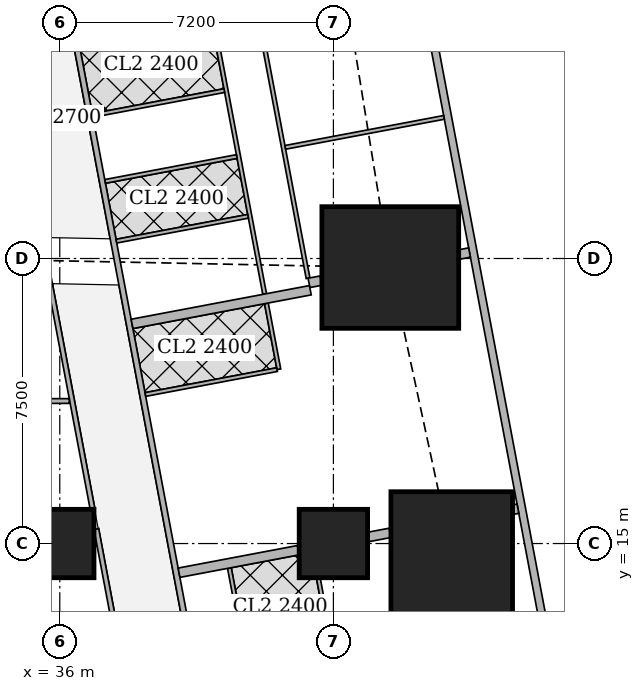
"""IFC4 building model, lengths in metres.
Left out: names, types, materials, properties, quantities, classifications, styles, units other than length and angle.
Written with IfcOpenShell. Run it as: python <this file> out.ifc"""

import sys

from ifc_helpers import new_model, si_unit, direction, frame, frame_2d, origin, origin_2d, place, context, subcontext, project, spatial, rectangle, extrude, element, fill, save


model = new_model("IFC4")
c1 = context("Model", 3, precision=1e-05, world=origin(), true_north=direction((0.0, 1.0)))
c2 = subcontext(c1, "Body", "Model", "MODEL_VIEW")
j1 = project(units=[si_unit("LENGTHUNIT", "METRE"), si_unit("PLANEANGLEUNIT", "RADIAN")], contexts=[c1])
p1 = place(None, origin())
s1 = spatial("IfcSite", under=j1, at=p1, CompositionType="ELEMENT")
p2 = place(p1, origin())
s2 = spatial("IfcBuilding", under=s1, at=p2, CompositionType="ELEMENT")
p3 = place(p2, frame((0.0, 0.0, 20.0)))
s3 = spatial("IfcBuildingStorey", under=s2, at=p3, CompositionType="ELEMENT", Elevation=20.0)
for number, where, z_axis, x_axis in (
    (1, (36.0, 15.0, 0.0), (0.0, 0.0, 1.0), (1.0, 0.0, 0.0)),
    (2, (43.2, 15.0, 0.0), (0.0, 0.0, 1.0), (1.0, 0.0, 0.0)),
):
    element("IfcColumn", number, at=place(p3, frame(where, z_axis=z_axis, x_axis=x_axis)), inside=s3, PredefinedType="COLUMN", context=c2, shape_type="SweptSolid", body=[
        extrude(rectangle(XDim=1.8, YDim=1.8, at=origin_2d()), origin(), (0.0, 0.0, 1.0), 3.75),
    ])
p4 = place(p3, frame((46.314, 14.763, 0.0), z_axis=(0.0, 0.0, 1.0), x_axis=(1.0, 0.0, 0.0)))
e3 = element("IfcColumn", 3, at=p4, inside=s3, PredefinedType="COLUMN", context=c2, shape_type="SweptSolid", body=[
    extrude(rectangle(XDim=3.2, YDim=3.2, at=origin_2d()), origin(), (0.0, 0.0, 1.0), 3.75),
])
p5 = place(p3, frame((44.697, 22.263, 0.0), z_axis=(0.0, 0.0, 1.0), x_axis=(1.0, 0.0, 0.0)))
e4 = element("IfcColumn", 4, at=p5, inside=s3, PredefinedType="COLUMN", context=c2, shape_type="SweptSolid", body=[
    extrude(rectangle(XDim=3.6, YDim=3.2, at=origin_2d()), origin(), (0.0, 0.0, 1.0), 3.75),
])
p6 = place(p3, frame((50.653, 2.703, 0.0), z_axis=(0.0, 0.0, 1.0), x_axis=(-0.185612026696, 0.982623109613, 0.0)))
e5 = element("IfcWall", 5, at=p6, inside=s3, PredefinedType="SOLIDWALL", context=c2, shape_type="SweptSolid", body=[
    extrude(rectangle(XDim=41.393, YDim=0.2, at=frame_2d((20.697, 0.0))), origin(), (0.0, 0.0, 1.0), 3.5),
])
p7 = place(p6, frame((1.633, 0.0, 0.9)))
e6 = element("IfcOpeningElement", 6, at=p7, cuts=e5, PredefinedType="OPENING", context=c2, shape_type="SweptSolid", body=[
    extrude(rectangle(XDim=1.8, YDim=1.5, at=frame_2d((0.9, 0.75))), frame((0.0, 0.11, 0.0), z_axis=(0.0, -1.0, 0.0), x_axis=(1.0, 0.0, 0.0)), (0.0, 0.0, 1.0), 0.22),
])
p8 = place(p6, frame((6.032, 0.0, 0.9)))
e7 = element("IfcOpeningElement", 7, at=p8, cuts=e5, PredefinedType="OPENING", context=c2, shape_type="SweptSolid", body=[
    extrude(rectangle(XDim=1.8, YDim=1.5, at=frame_2d((0.9, 0.75))), frame((0.0, 0.11, 0.0), z_axis=(0.0, -1.0, 0.0), x_axis=(1.0, 0.0, 0.0)), (0.0, 0.0, 1.0), 0.22),
])
p9 = place(p6, frame((9.848, 0.0, 0.9)))
e8 = element("IfcOpeningElement", 8, at=p9, cuts=e5, PredefinedType="OPENING", context=c2, shape_type="SweptSolid", body=[
    extrude(rectangle(XDim=1.8, YDim=1.5, at=frame_2d((0.9, 0.75))), frame((0.0, 0.11, 0.0), z_axis=(0.0, -1.0, 0.0), x_axis=(1.0, 0.0, 0.0)), (0.0, 0.0, 1.0), 0.22),
])
p10 = place(p6, frame((17.481, 0.0, 0.9)))
e9 = element("IfcOpeningElement", 9, at=p10, cuts=e5, PredefinedType="OPENING", context=c2, shape_type="SweptSolid", body=[
    extrude(rectangle(XDim=1.8, YDim=1.5, at=frame_2d((0.9, 0.75))), frame((0.0, 0.11, 0.0), z_axis=(0.0, -1.0, 0.0), x_axis=(1.0, 0.0, 0.0)), (0.0, 0.0, 1.0), 0.22),
])
p11 = place(p6, frame((21.297, 0.0, 0.9)))
e10 = element("IfcOpeningElement", 10, at=p11, cuts=e5, PredefinedType="OPENING", context=c2, shape_type="SweptSolid", body=[
    extrude(rectangle(XDim=1.8, YDim=1.5, at=frame_2d((0.9, 0.75))), frame((0.0, 0.11, 0.0), z_axis=(0.0, -1.0, 0.0), x_axis=(1.0, 0.0, 0.0)), (0.0, 0.0, 1.0), 0.22),
])
p12 = place(p6, frame((25.113, 0.0, 0.9)))
e11 = element("IfcOpeningElement", 11, at=p12, cuts=e5, PredefinedType="OPENING", context=c2, shape_type="SweptSolid", body=[
    extrude(rectangle(XDim=1.8, YDim=1.5, at=frame_2d((0.9, 0.75))), frame((0.0, 0.11, 0.0), z_axis=(0.0, -1.0, 0.0), x_axis=(1.0, 0.0, 0.0)), (0.0, 0.0, 1.0), 0.22),
])
p13 = place(p6, frame((28.93, 0.0, 0.9)))
e12 = element("IfcOpeningElement", 12, at=p13, cuts=e5, PredefinedType="OPENING", context=c2, shape_type="SweptSolid", body=[
    extrude(rectangle(XDim=1.8, YDim=1.5, at=frame_2d((0.9, 0.75))), frame((0.0, 0.11, 0.0), z_axis=(0.0, -1.0, 0.0), x_axis=(1.0, 0.0, 0.0)), (0.0, 0.0, 1.0), 0.22),
])
p14 = place(p6, frame((32.746, 0.0, 0.9)))
e13 = element("IfcOpeningElement", 13, at=p14, cuts=e5, PredefinedType="OPENING", context=c2, shape_type="SweptSolid", body=[
    extrude(rectangle(XDim=1.8, YDim=1.5, at=frame_2d((0.9, 0.75))), frame((0.0, 0.11, 0.0), z_axis=(0.0, -1.0, 0.0), x_axis=(1.0, 0.0, 0.0)), (0.0, 0.0, 1.0), 0.22),
])
p15 = place(p6, frame((36.481, 0.0, 0.9)))
e14 = element("IfcOpeningElement", 14, at=p15, cuts=e5, PredefinedType="OPENING", context=c2, shape_type="SweptSolid", body=[
    extrude(rectangle(XDim=1.8, YDim=1.5, at=frame_2d((0.9, 0.75))), frame((0.0, 0.11, 0.0), z_axis=(0.0, -1.0, 0.0), x_axis=(1.0, 0.0, 0.0)), (0.0, 0.0, 1.0), 0.22),
])
p16 = place(p3, frame((33.755, 42.325, 0.0), z_axis=(0.0, 0.0, 1.0), x_axis=(0.185611461091, -0.982623216453, 0.0)))
e15 = element("IfcWall", 15, at=p16, inside=s3, PredefinedType="SOLIDWALL", context=c2, shape_type="SweptSolid", body=[
    extrude(rectangle(XDim=40.241, YDim=0.15, at=frame_2d((20.121, 0.0))), origin(), (0.0, 0.0, 1.0), 2.5),
])
p17 = place(p16, frame((7.325, 0.0, 0.0)))
e16 = element("IfcOpeningElement", 16, at=p17, cuts=e15, PredefinedType="OPENING", context=c2, shape_type="SweptSolid", body=[
    extrude(rectangle(XDim=1.0, YDim=2.1, at=frame_2d((0.5, 1.05))), frame((0.0, 0.085, 0.0), z_axis=(0.0, -1.0, 0.0), x_axis=(1.0, 0.0, 0.0)), (0.0, 0.0, 1.0), 0.17),
])
p18 = place(p16, frame((11.902, 0.0, 0.0)))
e17 = element("IfcOpeningElement", 17, at=p18, cuts=e15, PredefinedType="OPENING", context=c2, shape_type="SweptSolid", body=[
    extrude(rectangle(XDim=1.0, YDim=2.1, at=frame_2d((0.5, 1.05))), frame((0.0, 0.085, 0.0), z_axis=(0.0, -1.0, 0.0), x_axis=(1.0, 0.0, 0.0)), (0.0, 0.0, 1.0), 0.17),
])
p19 = place(p16, frame((25.718, 0.0, 0.0)))
e18 = element("IfcOpeningElement", 18, at=p19, cuts=e15, PredefinedType="OPENING", context=c2, shape_type="SweptSolid", body=[
    extrude(rectangle(XDim=1.0, YDim=2.1, at=frame_2d((0.5, 1.05))), frame((0.0, 0.085, 0.0), z_axis=(0.0, -1.0, 0.0), x_axis=(1.0, 0.0, 0.0)), (0.0, 0.0, 1.0), 0.17),
])
p20 = place(p16, frame((31.788, 0.0, 0.0)))
e19 = element("IfcOpeningElement", 19, at=p20, cuts=e15, PredefinedType="OPENING", context=c2, shape_type="SweptSolid", body=[
    extrude(rectangle(XDim=1.0, YDim=2.1, at=frame_2d((0.5, 1.05))), frame((0.0, 0.085, 0.0), z_axis=(0.0, -1.0, 0.0), x_axis=(1.0, 0.0, 0.0)), (0.0, 0.0, 1.0), 0.17),
])
p21 = place(p3, frame((41.157, 29.273, 0.0), z_axis=(0.0, 0.0, 1.0), x_axis=(0.18542464283, -0.982658486877, 0.0)))
e20 = element("IfcWall", 20, at=p21, inside=s3, PredefinedType="PARTITIONING", context=c2, shape_type="SweptSolid", body=[
    extrude(rectangle(XDim=7.421, YDim=0.1, at=frame_2d((3.71, 0.0))), origin(), (0.0, 0.0, 1.0), 2.5),
])
p22 = place(p21, frame((1.4, 0.0, 0.0)))
e21 = element("IfcOpeningElement", 21, at=p22, cuts=e20, PredefinedType="OPENING", context=c2, shape_type="SweptSolid", body=[
    extrude(rectangle(XDim=0.9, YDim=2.1, at=frame_2d((0.45, 1.05))), frame((0.0, 0.06, 0.0), z_axis=(0.0, -1.0, 0.0), x_axis=(1.0, 0.0, 0.0)), (0.0, 0.0, 1.0), 0.12),
])
p23 = place(p21, frame((4.126, 0.0, 0.0)))
e22 = element("IfcOpeningElement", 22, at=p23, cuts=e20, PredefinedType="OPENING", context=c2, shape_type="SweptSolid", body=[
    extrude(rectangle(XDim=0.9, YDim=2.1, at=frame_2d((0.45, 1.05))), frame((0.0, 0.06, 0.0), z_axis=(0.0, -1.0, 0.0), x_axis=(1.0, 0.0, 0.0)), (0.0, 0.0, 1.0), 0.12),
])
p24 = place(p3, frame((39.997, 28.942, 0.0), z_axis=(0.0, 0.0, 1.0), x_axis=(0.185686318797, -0.982609073341, 0.0)))
e23 = element("IfcWall", 23, at=p24, inside=s3, PredefinedType="PARTITIONING", context=c2, shape_type="SweptSolid", body=[
    extrude(rectangle(XDim=7.508, YDim=0.1, at=frame_2d((3.754, 0.0))), origin(), (0.0, 0.0, 1.0), 2.5),
])
p25 = place(p24, frame((0.576, 0.0, 0.0)))
e24 = element("IfcOpeningElement", 24, at=p25, cuts=e23, PredefinedType="OPENING", context=c2, shape_type="SweptSolid", body=[
    extrude(rectangle(XDim=0.9, YDim=2.1, at=frame_2d((0.45, 1.05))), frame((0.0, 0.06, 0.0), z_axis=(0.0, -1.0, 0.0), x_axis=(1.0, 0.0, 0.0)), (0.0, 0.0, 1.0), 0.12),
])
p26 = place(p24, frame((4.166, 0.0, 0.0)))
e25 = element("IfcOpeningElement", 25, at=p26, cuts=e23, PredefinedType="OPENING", context=c2, shape_type="SweptSolid", body=[
    extrude(rectangle(XDim=0.9, YDim=2.1, at=frame_2d((0.45, 1.05))), frame((0.0, 0.06, 0.0), z_axis=(0.0, -1.0, 0.0), x_axis=(1.0, 0.0, 0.0)), (0.0, 0.0, 1.0), 0.12),
])
p27 = place(p24, frame((2.483, 0.0, 0.0)))
e26 = element("IfcOpeningElement", 26, at=p27, cuts=e23, PredefinedType="OPENING", context=c2, shape_type="SweptSolid", body=[
    extrude(rectangle(XDim=0.9, YDim=2.1, at=frame_2d((0.45, 1.05))), frame((0.0, 0.06, 0.0), z_axis=(0.0, -1.0, 0.0), x_axis=(1.0, 0.0, 0.0)), (0.0, 0.0, 1.0), 0.12),
])
p28 = place(p24, frame((6.074, 0.0, 0.0)))
e27 = element("IfcOpeningElement", 27, at=p28, cuts=e23, PredefinedType="OPENING", context=c2, shape_type="SweptSolid", body=[
    extrude(rectangle(XDim=0.9, YDim=2.1, at=frame_2d((0.45, 1.05))), frame((0.0, 0.06, 0.0), z_axis=(0.0, -1.0, 0.0), x_axis=(1.0, 0.0, 0.0)), (0.0, 0.0, 1.0), 0.12),
])
p29 = place(p3, frame((46.11, 26.213, 0.0), z_axis=(0.0, 0.0, 1.0), x_axis=(-0.982623519589, -0.185609856287, 0.0)))
e28 = element("IfcWall", 28, at=p29, inside=s3, PredefinedType="PARTITIONING", context=c2, shape_type="SweptSolid", body=[
    extrude(rectangle(XDim=4.25, YDim=0.1, at=frame_2d((2.125, 0.0))), origin(), (0.0, 0.0, 1.0), 2.05),
])
p30 = place(p3, frame((40.656, 25.183, 0.0), z_axis=(0.0, 0.0, 1.0), x_axis=(-0.982576058723, -0.185860939478, 0.0)))
e29 = element("IfcWall", 29, at=p30, inside=s3, PredefinedType="PARTITIONING", context=c2, shape_type="SweptSolid", body=[
    extrude(rectangle(XDim=3.524, YDim=0.1, at=frame_2d((1.762, 0.0))), origin(), (0.0, 0.0, 1.0), 3.5),
])
p31 = place(p3, frame((40.329, 26.918, 0.0), z_axis=(0.0, 0.0, 1.0), x_axis=(-0.982638553676, -0.185530247748, 0.0)))
e30 = element("IfcWall", 30, at=p31, inside=s3, PredefinedType="PARTITIONING", context=c2, shape_type="SweptSolid", body=[
    extrude(rectangle(XDim=3.525, YDim=0.1, at=frame_2d((1.763, 0.0))), origin(), (0.0, 0.0, 1.0), 3.5),
])
p32 = place(p3, frame((40.954, 23.61, 0.0), z_axis=(0.0, 0.0, 1.0), x_axis=(-0.982638553676, -0.185530247748, 0.0)))
e31 = element("IfcWall", 31, at=p32, inside=s3, PredefinedType="PARTITIONING", context=c2, shape_type="SweptSolid", body=[
    extrude(rectangle(XDim=3.525, YDim=0.1, at=frame_2d((1.763, 0.0))), origin(), (0.0, 0.0, 1.0), 2.5),
])
p33 = place(p3, frame((41.437, 21.319, 0.0), z_axis=(0.0, 0.0, 1.0), x_axis=(0.185783379659, -0.98259072652, 0.0)))
e32 = element("IfcWall", 32, at=p33, inside=s3, PredefinedType="PARTITIONING", context=c2, shape_type="SweptSolid", body=[
    extrude(rectangle(XDim=1.765, YDim=0.1, at=frame_2d((0.882, 0.0))), origin(), (0.0, 0.0, 1.0), 3.5),
])
p34 = place(p33, frame((0.374, 0.0, 0.0)))
e33 = element("IfcOpeningElement", 33, at=p34, cuts=e32, PredefinedType="OPENING", context=c2, shape_type="SweptSolid", body=[
    extrude(rectangle(XDim=0.9, YDim=2.1, at=frame_2d((0.45, 1.05))), frame((0.0, 0.06, 0.0), z_axis=(0.0, -1.0, 0.0), x_axis=(1.0, 0.0, 0.0)), (0.0, 0.0, 1.0), 0.12),
])
p35 = place(p3, frame((41.716, 19.576, 0.0), z_axis=(0.0, 0.0, 1.0), x_axis=(-0.982588017646, -0.185797706064, 0.0)))
e34 = element("IfcWall", 34, at=p35, inside=s3, PredefinedType="PARTITIONING", context=c2, shape_type="SweptSolid", body=[
    extrude(rectangle(XDim=3.525, YDim=0.1, at=frame_2d((1.763, 0.0))), origin(), (0.0, 0.0, 1.0), 3.5),
])
p36 = place(p3, frame((46.782, 22.657, 0.0), z_axis=(0.0, 0.0, 1.0), x_axis=(-0.982104607121, -0.188336243648, 0.0)))
e35 = element("IfcWall", 35, at=p36, inside=s3, PredefinedType="SOLIDWALL", context=c2, shape_type="SweptSolid", body=[
    extrude(rectangle(XDim=0.266, YDim=0.25, at=frame_2d((0.133, 0.0))), origin(), (0.0, 0.0, 1.0), 3.5),
])
p37 = place(p3, frame((42.873, 21.918, 0.0), z_axis=(0.0, 0.0, 1.0), x_axis=(-0.982431406936, -0.186624035603, 0.0)))
e36 = element("IfcWall", 36, at=p37, inside=s3, PredefinedType="SOLIDWALL", context=c2, shape_type="SweptSolid", body=[
    extrude(rectangle(XDim=0.322, YDim=0.25, at=frame_2d((0.161, 0.0))), origin(), (0.0, 0.0, 1.0), 2.5),
])
p38 = place(p3, frame((42.593, 21.665, 0.0), z_axis=(0.0, 0.0, 1.0), x_axis=(-0.982635807605, -0.185544791394, 0.0)))
e37 = element("IfcWall", 37, at=p38, inside=s3, PredefinedType="SOLIDWALL", context=c2, shape_type="SweptSolid", body=[
    extrude(rectangle(XDim=4.775, YDim=0.25, at=frame_2d((2.388, 0.0))), origin(), (0.0, 0.0, 1.0), 2.5),
])
p39 = place(p3, frame((42.803, 14.09, 0.0), z_axis=(0.0, 0.0, 1.0), x_axis=(0.185608486942, -0.982623778246, 0.0)))
e38 = element("IfcWall", 38, at=p39, inside=s3, PredefinedType="PARTITIONING", context=c2, shape_type="SweptSolid", body=[
    extrude(rectangle(XDim=1.53, YDim=0.1, at=frame_2d((0.765, 0.0))), origin(), (0.0, 0.0, 1.0), 3.5),
])
p40 = place(p39, frame((0.48, 0.0, 0.0)))
e39 = element("IfcOpeningElement", 39, at=p40, cuts=e38, PredefinedType="OPENING", context=c2, shape_type="SweptSolid", body=[
    extrude(rectangle(XDim=0.9, YDim=2.1, at=frame_2d((0.45, 1.05))), frame((0.0, 0.06, 0.0), z_axis=(0.0, -1.0, 0.0), x_axis=(1.0, 0.0, 0.0)), (0.0, 0.0, 1.0), 0.12),
])
p41 = place(p3, frame((40.463, 14.355, 0.0), z_axis=(0.0, 0.0, 1.0), x_axis=(0.185760900029, -0.98259497659, 0.0)))
e40 = element("IfcWall", 40, at=p41, inside=s3, PredefinedType="PARTITIONING", context=c2, shape_type="SweptSolid", body=[
    extrude(rectangle(XDim=2.192, YDim=0.1, at=frame_2d((1.096, 0.0))), origin(), (0.0, 0.0, 1.0), 3.5),
])
p42 = place(p3, frame((48.055, 15.917, 0.0), z_axis=(0.0, 0.0, 1.0), x_axis=(-0.98280243359, -0.184660164975, 0.0)))
e41 = element("IfcWall", 41, at=p42, inside=s3, PredefinedType="SOLIDWALL", context=c2, shape_type="SweptSolid", body=[
    extrude(rectangle(XDim=0.119, YDim=0.25, at=frame_2d((0.06, 0.0))), origin(), (0.0, 0.0, 1.0), 3.5),
])
p43 = place(p3, frame((44.69, 15.281, 0.0), z_axis=(0.0, 0.0, 1.0), x_axis=(-0.982612073204, -0.185670443513, 0.0)))
e42 = element("IfcWall", 42, at=p43, inside=s3, PredefinedType="SOLIDWALL", context=c2, shape_type="SweptSolid", body=[
    extrude(rectangle(XDim=0.576, YDim=0.25, at=frame_2d((0.288, 0.0))), origin(), (0.0, 0.0, 1.0), 2.05),
])
p44 = place(p3, frame((42.276, 14.825, 0.0), z_axis=(0.0, 0.0, 1.0), x_axis=(-0.982607211054, -0.185696173318, 0.0)))
e43 = element("IfcWall", 43, at=p44, inside=s3, PredefinedType="SOLIDWALL", context=c2, shape_type="SweptSolid", body=[
    extrude(rectangle(XDim=3.194, YDim=0.25, at=frame_2d((1.597, 0.0))), origin(), (0.0, 0.0, 1.0), 3.5),
])
p45 = place(p3, frame((37.9, 10.413, 0.0), z_axis=(0.0, 0.0, 1.0), x_axis=(-0.185527510388, 0.982639070508, 0.0)))
e44 = element("IfcWall", 44, at=p45, inside=s3, PredefinedType="PARTITIONING", context=c2, shape_type="SweptSolid", body=[
    extrude(rectangle(XDim=5.056, YDim=0.125, at=frame_2d((2.528, 0.0))), origin(), (0.0, 0.0, 1.0), 3.5),
])
p46 = place(p45, frame((0.708, 0.0, 0.0)))
e45 = element("IfcOpeningElement", 45, at=p46, cuts=e44, PredefinedType="OPENING", context=c2, shape_type="SweptSolid", body=[
    extrude(rectangle(XDim=1.0, YDim=2.1, at=frame_2d((0.5, 1.05))), frame((0.0, 0.073, 0.0), z_axis=(0.0, -1.0, 0.0), x_axis=(1.0, 0.0, 0.0)), (0.0, 0.0, 1.0), 0.145),
])
p47 = place(p3, frame((36.861, 15.913, 0.0), z_axis=(0.0, 0.0, 1.0), x_axis=(-0.185598960122, 0.982625577726, 0.0)))
e46 = element("IfcWall", 46, at=p47, inside=s3, PredefinedType="PARTITIONING", context=c2, shape_type="SweptSolid", body=[
    extrude(rectangle(XDim=6.703, YDim=0.125, at=frame_2d((3.352, 0.0))), origin(), (0.0, 0.0, 1.0), 2.5),
])
p48 = place(p47, frame((0.25, 0.0, 0.0)))
e47 = element("IfcOpeningElement", 47, at=p48, cuts=e46, PredefinedType="OPENING", context=c2, shape_type="SweptSolid", body=[
    extrude(rectangle(XDim=1.0, YDim=2.1, at=frame_2d((0.5, 1.05))), frame((0.0, 0.073, 0.0), z_axis=(0.0, -1.0, 0.0), x_axis=(1.0, 0.0, 0.0)), (0.0, 0.0, 1.0), 0.145),
])
p49 = place(p47, frame((3.71, 0.0, 0.0)))
e48 = element("IfcOpeningElement", 48, at=p49, cuts=e46, PredefinedType="OPENING", context=c2, shape_type="SweptSolid", body=[
    extrude(rectangle(XDim=1.0, YDim=2.1, at=frame_2d((0.5, 1.05))), frame((0.0, 0.073, 0.0), z_axis=(0.0, -1.0, 0.0), x_axis=(1.0, 0.0, 0.0)), (0.0, 0.0, 1.0), 0.145),
])
p50 = place(p3, frame((36.901, 15.0, 0.0), z_axis=(0.0, 0.0, 1.0), x_axis=(1.0, 0.0, 0.0)))
e49 = element("IfcWall", 49, at=p50, inside=s3, PredefinedType="PARTITIONING", context=c2, shape_type="SweptSolid", body=[
    extrude(rectangle(XDim=0.057, YDim=0.125, at=frame_2d((0.029, 0.0))), origin(), (0.0, 0.0, 1.0), 3.5),
])
p51 = place(p3, frame((29.25, 18.75, 0.0), z_axis=(0.0, 0.0, 1.0), x_axis=(1.0, 0.0, 0.0)))
e50 = element("IfcWall", 50, at=p51, inside=s3, PredefinedType="PARTITIONING", context=c2, shape_type="SweptSolid", body=[
    extrude(rectangle(XDim=7.0, YDim=0.125, at=frame_2d((3.5, 0.0))), origin(), (0.0, 0.0, 1.0), 3.5),
])
p52 = place(p9, origin())
e51 = element("IfcWindow", 51, at=p52, inside=s3, PartitioningType="SINGLE_PANEL", PredefinedType="WINDOW", context=c2, shape_type="SweptSolid", body=[
    extrude(rectangle(XDim=1.8, YDim=1.5, at=frame_2d((0.9, 0.75))), frame((0.0, 0.03, 0.0), z_axis=(0.0, -1.0, 0.0), x_axis=(1.0, 0.0, 0.0)), (0.0, 0.0, 1.0), 0.06),
])
fill(e8, e51)
p53 = place(p10, origin())
e52 = element("IfcWindow", 52, at=p53, inside=s3, PartitioningType="SINGLE_PANEL", PredefinedType="WINDOW", context=c2, shape_type="SweptSolid", body=[
    extrude(rectangle(XDim=1.8, YDim=1.5, at=frame_2d((0.9, 0.75))), frame((0.0, 0.03, 0.0), z_axis=(0.0, -1.0, 0.0), x_axis=(1.0, 0.0, 0.0)), (0.0, 0.0, 1.0), 0.06),
])
fill(e9, e52)
p54 = place(p11, origin())
e53 = element("IfcWindow", 53, at=p54, inside=s3, PartitioningType="SINGLE_PANEL", PredefinedType="WINDOW", context=c2, shape_type="SweptSolid", body=[
    extrude(rectangle(XDim=1.8, YDim=1.5, at=frame_2d((0.9, 0.75))), frame((0.0, 0.03, 0.0), z_axis=(0.0, -1.0, 0.0), x_axis=(1.0, 0.0, 0.0)), (0.0, 0.0, 1.0), 0.06),
])
fill(e10, e53)
p55 = place(p12, origin())
e54 = element("IfcWindow", 54, at=p55, inside=s3, PartitioningType="SINGLE_PANEL", PredefinedType="WINDOW", context=c2, shape_type="SweptSolid", body=[
    extrude(rectangle(XDim=1.8, YDim=1.5, at=frame_2d((0.9, 0.75))), frame((0.0, 0.03, 0.0), z_axis=(0.0, -1.0, 0.0), x_axis=(1.0, 0.0, 0.0)), (0.0, 0.0, 1.0), 0.06),
])
fill(e11, e54)
p56 = place(p22, origin())
e55 = element("IfcDoor", 55, at=p56, inside=s3, OperationType="SINGLE_SWING_LEFT", PredefinedType="DOOR", context=c2, shape_type="SweptSolid", body=[
    extrude(rectangle(XDim=0.9, YDim=2.1, at=frame_2d((0.45, 1.05))), frame((0.0, 0.025, 0.0), z_axis=(0.0, -1.0, 0.0), x_axis=(1.0, 0.0, 0.0)), (0.0, 0.0, 1.0), 0.05),
])
fill(e21, e55)
p57 = place(p23, origin())
e56 = element("IfcDoor", 56, at=p57, inside=s3, OperationType="SINGLE_SWING_LEFT", PredefinedType="DOOR", context=c2, shape_type="SweptSolid", body=[
    extrude(rectangle(XDim=0.9, YDim=2.1, at=frame_2d((0.45, 1.05))), frame((0.0, 0.025, 0.0), z_axis=(0.0, -1.0, 0.0), x_axis=(1.0, 0.0, 0.0)), (0.0, 0.0, 1.0), 0.05),
])
fill(e22, e56)
p58 = place(p25, origin())
e57 = element("IfcDoor", 57, at=p58, inside=s3, OperationType="SINGLE_SWING_RIGHT", PredefinedType="DOOR", context=c2, shape_type="SweptSolid", body=[
    extrude(rectangle(XDim=0.9, YDim=2.1, at=frame_2d((0.45, 1.05))), frame((0.0, 0.025, 0.0), z_axis=(0.0, -1.0, 0.0), x_axis=(1.0, 0.0, 0.0)), (0.0, 0.0, 1.0), 0.05),
])
fill(e24, e57)
p59 = place(p26, origin())
e58 = element("IfcDoor", 58, at=p59, inside=s3, OperationType="SINGLE_SWING_LEFT", PredefinedType="DOOR", context=c2, shape_type="SweptSolid", body=[
    extrude(rectangle(XDim=0.9, YDim=2.1, at=frame_2d((0.45, 1.05))), frame((0.0, 0.025, 0.0), z_axis=(0.0, -1.0, 0.0), x_axis=(1.0, 0.0, 0.0)), (0.0, 0.0, 1.0), 0.05),
])
fill(e25, e58)
p60 = place(p27, origin())
e59 = element("IfcDoor", 59, at=p60, inside=s3, OperationType="SINGLE_SWING_LEFT", PredefinedType="DOOR", context=c2, shape_type="SweptSolid", body=[
    extrude(rectangle(XDim=0.9, YDim=2.1, at=frame_2d((0.45, 1.05))), frame((0.0, 0.025, 0.0), z_axis=(0.0, -1.0, 0.0), x_axis=(1.0, 0.0, 0.0)), (0.0, 0.0, 1.0), 0.05),
])
fill(e26, e59)
p61 = place(p28, origin())
e60 = element("IfcDoor", 60, at=p61, inside=s3, OperationType="SINGLE_SWING_LEFT", PredefinedType="DOOR", context=c2, shape_type="SweptSolid", body=[
    extrude(rectangle(XDim=0.9, YDim=2.1, at=frame_2d((0.45, 1.05))), frame((0.0, 0.025, 0.0), z_axis=(0.0, -1.0, 0.0), x_axis=(1.0, 0.0, 0.0)), (0.0, 0.0, 1.0), 0.05),
])
fill(e27, e60)
p62 = place(p34, origin())
e61 = element("IfcDoor", 61, at=p62, inside=s3, OperationType="SINGLE_SWING_RIGHT", PredefinedType="DOOR", context=c2, shape_type="SweptSolid", body=[
    extrude(rectangle(XDim=0.9, YDim=2.1, at=frame_2d((0.45, 1.05))), frame((0.0, 0.025, 0.0), z_axis=(0.0, -1.0, 0.0), x_axis=(1.0, 0.0, 0.0)), (0.0, 0.0, 1.0), 0.05),
])
fill(e33, e61)
p63 = place(p19, origin())
e62 = element("IfcDoor", 62, at=p63, inside=s3, OperationType="SINGLE_SWING_RIGHT", PredefinedType="DOOR", context=c2, shape_type="SweptSolid", body=[
    extrude(rectangle(XDim=1.0, YDim=2.1, at=frame_2d((0.5, 1.05))), frame((0.0, 0.025, 0.0), z_axis=(0.0, -1.0, 0.0), x_axis=(1.0, 0.0, 0.0)), (0.0, 0.0, 1.0), 0.05),
])
fill(e18, e62)
p64 = place(p40, origin())
e63 = element("IfcDoor", 63, at=p64, inside=s3, OperationType="SINGLE_SWING_LEFT", PredefinedType="DOOR", context=c2, shape_type="SweptSolid", body=[
    extrude(rectangle(XDim=0.9, YDim=2.1, at=frame_2d((0.45, 1.05))), frame((0.0, 0.025, 0.0), z_axis=(0.0, -1.0, 0.0), x_axis=(1.0, 0.0, 0.0)), (0.0, 0.0, 1.0), 0.05),
])
fill(e39, e63)
p65 = place(p48, origin())
e64 = element("IfcDoor", 64, at=p65, inside=s3, OperationType="SINGLE_SWING_LEFT", PredefinedType="DOOR", context=c2, shape_type="SweptSolid", body=[
    extrude(rectangle(XDim=1.0, YDim=2.1, at=frame_2d((0.5, 1.05))), frame((0.0, 0.025, 0.0), z_axis=(0.0, -1.0, 0.0), x_axis=(1.0, 0.0, 0.0)), (0.0, 0.0, 1.0), 0.05),
])
fill(e47, e64)
p66 = place(p49, origin())
e65 = element("IfcDoor", 65, at=p66, inside=s3, OperationType="SINGLE_SWING_LEFT", PredefinedType="DOOR", context=c2, shape_type="SweptSolid", body=[
    extrude(rectangle(XDim=1.0, YDim=2.1, at=frame_2d((0.5, 1.05))), frame((0.0, 0.025, 0.0), z_axis=(0.0, -1.0, 0.0), x_axis=(1.0, 0.0, 0.0)), (0.0, 0.0, 1.0), 0.05),
])
fill(e48, e65)
save(model, sys.argv[1])
